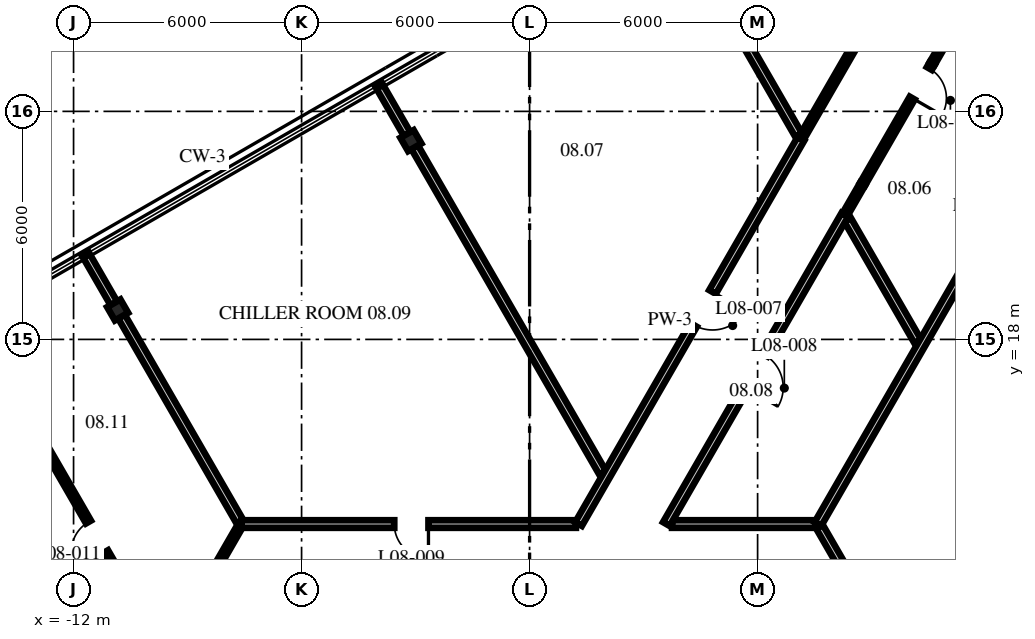
"""IFC4 building model, lengths in metres.
Left out: names, types, materials, properties, quantities, classifications, styles, units other than length and angle.
Written with IfcOpenShell. Run it as: python <this file> out.ifc"""

import sys

from ifc_helpers import new_model, si_unit, direction, frame, frame_2d, origin, origin_2d, place, context, subcontext, project, spatial, rectangle, i_section, extrude, source, transform, mapped, element, fill, save


model = new_model("IFC4")
c1 = context("Model", 3, precision=1e-05, world=origin(), true_north=direction((0.0, 1.0)))
c2 = subcontext(c1, "Body", "Model", "MODEL_VIEW")
j1 = project(units=[si_unit("LENGTHUNIT", "METRE"), si_unit("PLANEANGLEUNIT", "RADIAN")], contexts=[c1])
p1 = place(None, origin())
s1 = spatial("IfcSite", under=j1, at=p1, CompositionType="ELEMENT")
p2 = place(p1, origin())
s2 = spatial("IfcBuilding", under=s1, at=p2, CompositionType="ELEMENT")
p3 = place(p2, frame((0.0, 0.0, 37.5)))
s3 = spatial("IfcBuildingStorey", under=s2, at=p3, CompositionType="ELEMENT", Elevation=37.5)
m1 = source(origin(), c2, "Body", "SweptSolid", [
    extrude(i_section(OverallWidth=0.404, OverallDepth=0.406, WebThickness=0.027, FlangeThickness=0.044, at=origin_2d()), origin(), (0.0, 0.0, 1.0), 4.3),
])
for number, where, z_axis, x_axis in (
    (1, (-3.124, 23.23, 0.0), (0.0, 0.0, 1.0), (-0.866, -0.5, 0.0)),
    (2, (-10.84, 18.775, 0.0), (0.0, 0.0, 1.0), (-0.866, -0.5, 0.0)),
):
    element("IfcColumn", number, at=place(p3, frame(where, z_axis=z_axis, x_axis=x_axis)), inside=s3, PredefinedType="COLUMN", context=c2, shape_type="MappedRepresentation", body=[
        mapped(m1, transform((0.0, 0.0, 0.0), scale=1.0)),
    ])
p4 = place(p3, frame((-14.939, 14.965, 0.0), z_axis=(0.0, 0.0, 1.0), x_axis=(0.499977133552, -0.866038605332, 0.0)))
e3 = element("IfcWall", 3, at=p4, inside=s3, PredefinedType="PARTITIONING", context=c2, shape_type="SweptSolid", body=[
    extrude(rectangle(XDim=8.354, YDim=0.15, at=frame_2d((4.177, 0.0))), origin(), (0.0, 0.0, 1.0), 4.1),
])
p5 = place(p4, frame((3.74, 0.0, 0.0)))
e4 = element("IfcOpeningElement", 4, at=p5, cuts=e3, PredefinedType="OPENING", context=c2, shape_type="SweptSolid", body=[
    extrude(rectangle(XDim=0.9, YDim=2.1, at=frame_2d((0.45, 1.05))), frame((0.0, 0.085, 0.0), z_axis=(0.0, -1.0, 0.0), x_axis=(1.0, 0.0, 0.0)), (0.0, 0.0, 1.0), 0.17),
])
m2 = source(origin(), c2, "Body", "SweptSolid", [
    extrude(rectangle(XDim=7.249, YDim=0.15, at=frame_2d((3.625, 0.0))), origin(), (0.0, 0.0, 1.0), 4.1),
])
p6 = place(p3, frame((-13.207, 15.965, 0.0), z_axis=(0.0, 0.0, 1.0), x_axis=(0.500014967241, -0.866016762271, 0.0)))
e5 = element("IfcWall", 5, at=p6, inside=s3, PredefinedType="PARTITIONING", context=c2, shape_type="MappedRepresentation", body=[
    mapped(m2, transform((0.0, 0.0, 0.0), scale=1.0)),
])
p7 = place(p6, frame((3.199, 0.0, 0.0)))
e6 = element("IfcOpeningElement", 6, at=p7, cuts=e5, PredefinedType="OPENING", context=c2, shape_type="SweptSolid", body=[
    extrude(rectangle(XDim=0.9, YDim=2.1, at=frame_2d((0.45, 1.05))), frame((0.0, 0.085, 0.0), z_axis=(0.0, -1.0, 0.0), x_axis=(1.0, 0.0, 0.0)), (0.0, 0.0, 1.0), 0.17),
])
m3 = source(origin(), c2, "Body", "SweptSolid", [
    extrude(rectangle(XDim=1.499, YDim=0.2, at=frame_2d((0.749, 0.0))), origin(), (0.0, 0.0, 1.0), 4.1),
])
p8 = place(p3, frame((-11.686, 20.24, 0.0), z_axis=(0.0, 0.0, 1.0), x_axis=(0.499976292358, -0.866039090965, 0.0)))
e7 = element("IfcWall", 7, at=p8, inside=s3, PredefinedType="PARTITIONING", context=c2, shape_type="MappedRepresentation", body=[
    mapped(m3, transform((0.0, 0.0, 0.0), scale=1.0)),
])
m4 = source(origin(), c2, "Body", "SweptSolid", [
    extrude(rectangle(XDim=6.241, YDim=0.2, at=frame_2d((3.121, 0.0))), origin(), (0.0, 0.0, 1.0), 3.488),
])
p9 = place(p3, frame((-10.743, 18.608, 0.0), z_axis=(0.0, 0.0, 1.0), x_axis=(0.499988843237, -0.866031845049, 0.0)))
e8 = element("IfcWall", 8, at=p9, inside=s3, PredefinedType="PARTITIONING", context=c2, shape_type="MappedRepresentation", body=[
    mapped(m4, transform((0.0, 0.0, 0.0), scale=1.0)),
])
m5 = source(origin(), c2, "Body", "SweptSolid", [
    extrude(rectangle(XDim=1.499, YDim=0.2, at=frame_2d((0.75, 0.0))), origin(), (0.0, 0.0, 1.0), 4.1),
])
p10 = place(p3, frame((-3.969, 24.695, 0.0), z_axis=(0.0, 0.0, 1.0), x_axis=(0.499905760005, -0.866079806435, 0.0)))
e9 = element("IfcWall", 9, at=p10, inside=s3, PredefinedType="PARTITIONING", context=c2, shape_type="MappedRepresentation", body=[
    mapped(m5, transform((0.0, 0.0, 0.0), scale=1.0)),
])
m6 = source(origin(), c2, "Body", "SweptSolid", [
    extrude(rectangle(XDim=9.893, YDim=0.2, at=frame_2d((4.947, 0.0))), origin(), (0.0, 0.0, 1.0), 3.343),
])
p11 = place(p3, frame((-3.027, 23.063, 0.0), z_axis=(0.0, 0.0, 1.0), x_axis=(0.499990184253, -0.866031070834, 0.0)))
e10 = element("IfcWall", 10, at=p11, inside=s3, PredefinedType="PARTITIONING", context=c2, shape_type="MappedRepresentation", body=[
    mapped(m6, transform((0.0, 0.0, 0.0), scale=1.0)),
])
p12 = place(p3, frame((7.623, 13.082, 0.0), z_axis=(0.0, 0.0, 1.0), x_axis=(0.499985944963, -0.866033518312, 0.0)))
e11 = element("IfcWall", 11, at=p12, inside=s3, PredefinedType="PARTITIONING", context=c2, shape_type="SweptSolid", body=[
    extrude(rectangle(XDim=15.105, YDim=0.2, at=frame_2d((7.553, 0.0))), origin(), (0.0, 0.0, 1.0), 4.1),
])
p13 = place(p12, frame((9.455, 0.0, 0.0)))
e12 = element("IfcOpeningElement", 12, at=p13, cuts=e11, PredefinedType="OPENING", context=c2, shape_type="SweptSolid", body=[
    extrude(rectangle(XDim=1.0, YDim=2.1, at=frame_2d((0.5, 1.05))), frame((0.0, 0.11, 0.0), z_axis=(0.0, -1.0, 0.0), x_axis=(1.0, 0.0, 0.0)), (0.0, 0.0, 1.0), 0.22),
])
m7 = source(origin(), c2, "Body", "SweptSolid", [
    extrude(rectangle(XDim=4.779, YDim=0.2, at=frame_2d((2.389, 0.0))), origin(), (0.0, 0.0, 1.0), 3.488),
])
p14 = place(p3, frame((4.689, 27.518, 0.0), z_axis=(0.0, 0.0, 1.0), x_axis=(0.499990736708, -0.866030751883, 0.0)))
e13 = element("IfcWall", 13, at=p14, inside=s3, PredefinedType="PARTITIONING", context=c2, shape_type="MappedRepresentation", body=[
    mapped(m7, transform((0.0, 0.0, 0.0), scale=1.0)),
])
p15 = place(p3, frame((8.369, 21.145, 0.0), z_axis=(0.0, 0.0, 1.0), x_axis=(0.499982117899, -0.866035727774, 0.0)))
e14 = element("IfcWall", 14, at=p15, inside=s3, PredefinedType="PARTITIONING", context=c2, shape_type="SweptSolid", body=[
    extrude(rectangle(XDim=3.69, YDim=0.2, at=frame_2d((1.845, 0.0))), origin(), (0.0, 0.0, 1.0), 4.1),
])
p16 = place(p3, frame((-7.588, 13.142, 0.0), z_axis=(0.0, 0.0, 1.0), x_axis=(1.0, 0.0, 0.0)))
e15 = element("IfcWall", 15, at=p16, inside=s3, PredefinedType="PARTITIONING", context=c2, shape_type="SweptSolid", body=[
    extrude(rectangle(XDim=8.807, YDim=0.2, at=frame_2d((4.403, 0.0))), origin(), (0.0, 0.0, 1.0), 4.1),
])
p17 = place(p16, frame((4.027, 0.0, 0.0)))
e16 = element("IfcOpeningElement", 16, at=p17, cuts=e15, PredefinedType="OPENING", context=c2, shape_type="SweptSolid", body=[
    extrude(rectangle(XDim=0.9, YDim=2.1, at=frame_2d((0.45, 1.05))), frame((0.0, 0.11, 0.0), z_axis=(0.0, -1.0, 0.0), x_axis=(1.0, 0.0, 0.0)), (0.0, 0.0, 1.0), 0.22),
])
p18 = place(p3, frame((3.748, 13.142, 0.0), z_axis=(0.0, 0.0, 1.0), x_axis=(1.0, 0.0, 0.0)))
e17 = element("IfcWall", 17, at=p18, inside=s3, PredefinedType="PARTITIONING", context=c2, shape_type="SweptSolid", body=[
    extrude(rectangle(XDim=3.769, YDim=0.2, at=frame_2d((1.885, 0.0))), origin(), (0.0, 0.0, 1.0), 4.1),
])
p19 = place(p3, frame((7.588, 13.142, 0.0), z_axis=(0.0, 0.0, 1.0), x_axis=(0.500005822324, 0.866022042238, 0.0)))
e18 = element("IfcWall", 18, at=p19, inside=s3, PredefinedType="PARTITIONING", context=c2, shape_type="SweptSolid", body=[
    extrude(rectangle(XDim=18.62, YDim=0.2, at=frame_2d((9.31, 0.0))), origin(), (0.0, 0.0, 1.0), 4.1),
])
p20 = place(p3, frame((3.598, 13.142, 0.0), z_axis=(0.0, 0.0, 1.0), x_axis=(0.499987908195, 0.866032384879, 0.0)))
e19 = element("IfcWall", 19, at=p20, inside=s3, PredefinedType="PARTITIONING", context=c2, shape_type="SweptSolid", body=[
    extrude(rectangle(XDim=9.394, YDim=0.2, at=frame_2d((4.697, 0.0))), origin(), (0.0, 0.0, 1.0), 4.1),
])
p21 = place(p20, frame((4.15, 0.0, 0.0)))
e20 = element("IfcOpeningElement", 20, at=p21, cuts=e19, PredefinedType="OPENING", context=c2, shape_type="SweptSolid", body=[
    extrude(rectangle(XDim=1.0, YDim=2.1, at=frame_2d((0.5, 1.05))), frame((0.0, 0.11, 0.0), z_axis=(0.0, -1.0, 0.0), x_axis=(1.0, 0.0, 0.0)), (0.0, 0.0, 1.0), 0.22),
])
p22 = place(p3, frame((8.295, 21.278, 0.0), z_axis=(0.0, 0.0, 1.0), x_axis=(0.500002371706, 0.866024034475, 0.0)))
e21 = element("IfcWall", 21, at=p22, inside=s3, PredefinedType="PARTITIONING", context=c2, shape_type="SweptSolid", body=[
    extrude(rectangle(XDim=0.931, YDim=0.15, at=frame_2d((0.466, 0.0))), origin(), (0.0, 0.0, 1.0), 4.1),
])
p23 = place(p3, frame((8.761, 22.084, 0.0), z_axis=(0.0, 0.0, 1.0), x_axis=(0.499985736139, 0.866033638872, 0.0)))
e22 = element("IfcWall", 22, at=p23, inside=s3, PredefinedType="PARTITIONING", context=c2, shape_type="SweptSolid", body=[
    extrude(rectangle(XDim=3.666, YDim=0.15, at=frame_2d((1.833, 0.0))), origin(), (0.0, 0.0, 1.0), 3.158),
])
p24 = place(p23, frame((2.615, 0.0, 0.0)))
e23 = element("IfcOpeningElement", 23, at=p24, cuts=e22, PredefinedType="OPENING", context=c2, shape_type="SweptSolid", body=[
    extrude(rectangle(XDim=0.9, YDim=2.1, at=frame_2d((0.45, 1.05))), frame((0.0, 0.085, 0.0), z_axis=(0.0, -1.0, 0.0), x_axis=(1.0, 0.0, 0.0)), (0.0, 0.0, 1.0), 0.17),
])
p25 = place(p3, frame((10.594, 25.259, 0.0), z_axis=(0.0, 0.0, 1.0), x_axis=(0.500002112793, 0.866024183959, 0.0)))
e24 = element("IfcWall", 24, at=p25, inside=s3, PredefinedType="PARTITIONING", context=c2, shape_type="SweptSolid", body=[
    extrude(rectangle(XDim=5.567, YDim=0.15, at=frame_2d((2.783, 0.0))), origin(), (0.0, 0.0, 1.0), 4.1),
])
p26 = place(p25, frame((4.081, 0.0, 0.0)))
e25 = element("IfcOpeningElement", 25, at=p26, cuts=e24, PredefinedType="OPENING", context=c2, shape_type="SweptSolid", body=[
    extrude(rectangle(XDim=0.9, YDim=2.1, at=frame_2d((0.45, 1.05))), frame((0.0, 0.085, 0.0), z_axis=(0.0, -1.0, 0.0), x_axis=(1.0, 0.0, 0.0)), (0.0, 0.0, 1.0), 0.17),
])
p27 = place(p3, frame((1.289, 13.142, 0.0), z_axis=(0.0, 0.0, 1.0), x_axis=(0.499995716753, 0.866027876704, 0.0)))
e26 = element("IfcWall", 26, at=p27, inside=s3, PredefinedType="PARTITIONING", context=c2, shape_type="SweptSolid", body=[
    extrude(rectangle(XDim=11.704, YDim=0.2, at=frame_2d((5.852, 0.0))), origin(), (0.0, 0.0, 1.0), 4.1),
])
p28 = place(p27, frame((6.05, 0.0, 0.0)))
e27 = element("IfcOpeningElement", 27, at=p28, cuts=e26, PredefinedType="OPENING", context=c2, shape_type="SweptSolid", body=[
    extrude(rectangle(XDim=1.0, YDim=2.1, at=frame_2d((0.5, 1.05))), frame((0.0, 0.11, 0.0), z_axis=(0.0, -1.0, 0.0), x_axis=(1.0, 0.0, 0.0)), (0.0, 0.0, 1.0), 0.22),
])
p29 = place(p3, frame((7.141, 23.278, 0.0), z_axis=(0.0, 0.0, 1.0), x_axis=(0.500012266612, 0.866018321537, 0.0)))
e28 = element("IfcWall", 28, at=p29, inside=s3, PredefinedType="PARTITIONING", context=c2, shape_type="SweptSolid", body=[
    extrude(rectangle(XDim=7.681, YDim=0.15, at=frame_2d((3.84, 0.0))), origin(), (0.0, 0.0, 1.0), 4.1),
])
p30 = place(p29, frame((3.433, 0.0, 0.0)))
e29 = element("IfcOpeningElement", 29, at=p30, cuts=e28, PredefinedType="OPENING", context=c2, shape_type="SweptSolid", body=[
    extrude(rectangle(XDim=0.9, YDim=2.1, at=frame_2d((0.45, 1.05))), frame((0.0, 0.085, 0.0), z_axis=(0.0, -1.0, 0.0), x_axis=(1.0, 0.0, 0.0)), (0.0, 0.0, 1.0), 0.17),
])
p31 = place(p3, frame((-9.527, 9.783, 0.0), z_axis=(0.0, 0.0, 1.0), x_axis=(0.50001277644, 0.866018027177, 0.0)))
e30 = element("IfcWall", 30, at=p31, inside=s3, PredefinedType="PARTITIONING", context=c2, shape_type="SweptSolid", body=[
    extrude(rectangle(XDim=3.81, YDim=0.15, at=frame_2d((1.905, 0.0))), origin(), (0.0, 0.0, 1.0), 4.1),
])
p32 = place(p24, origin())
e31 = element("IfcDoor", 31, at=p32, inside=s3, OperationType="SINGLE_SWING_RIGHT", PredefinedType="DOOR", context=c2, shape_type="SweptSolid", body=[
    extrude(rectangle(XDim=0.9, YDim=2.1, at=frame_2d((0.45, 1.05))), frame((0.0, 0.025, 0.0), z_axis=(0.0, -1.0, 0.0), x_axis=(1.0, 0.0, 0.0)), (0.0, 0.0, 1.0), 0.05),
])
fill(e23, e31)
p33 = place(p28, origin())
e32 = element("IfcDoor", 32, at=p33, inside=s3, OperationType="SINGLE_SWING_RIGHT", PredefinedType="DOOR", context=c2, shape_type="SweptSolid", body=[
    extrude(rectangle(XDim=1.0, YDim=2.1, at=frame_2d((0.5, 1.05))), frame((0.0, 0.025, 0.0), z_axis=(0.0, -1.0, 0.0), x_axis=(1.0, 0.0, 0.0)), (0.0, 0.0, 1.0), 0.05),
])
fill(e27, e32)
p34 = place(p21, origin())
e33 = element("IfcDoor", 33, at=p34, inside=s3, OperationType="SINGLE_SWING_RIGHT", PredefinedType="DOOR", context=c2, shape_type="SweptSolid", body=[
    extrude(rectangle(XDim=1.0, YDim=2.1, at=frame_2d((0.5, 1.05))), frame((0.0, 0.025, 0.0), z_axis=(0.0, -1.0, 0.0), x_axis=(1.0, 0.0, 0.0)), (0.0, 0.0, 1.0), 0.05),
])
fill(e20, e33)
p35 = place(p17, origin())
e34 = element("IfcDoor", 34, at=p35, inside=s3, OperationType="SINGLE_SWING_RIGHT", PredefinedType="DOOR", context=c2, shape_type="SweptSolid", body=[
    extrude(rectangle(XDim=0.9, YDim=2.1, at=frame_2d((0.45, 1.05))), frame((0.0, 0.025, 0.0), z_axis=(0.0, -1.0, 0.0), x_axis=(1.0, 0.0, 0.0)), (0.0, 0.0, 1.0), 0.05),
])
fill(e16, e34)
p36 = place(p7, origin())
e35 = element("IfcDoor", 35, at=p36, inside=s3, OperationType="SINGLE_SWING_RIGHT", PredefinedType="DOOR", context=c2, shape_type="SweptSolid", body=[
    extrude(rectangle(XDim=0.9, YDim=2.1, at=frame_2d((0.45, 1.05))), frame((0.0, 0.025, 0.0), z_axis=(0.0, -1.0, 0.0), x_axis=(1.0, 0.0, 0.0)), (0.0, 0.0, 1.0), 0.05),
])
fill(e6, e35)
save(model, sys.argv[1])
